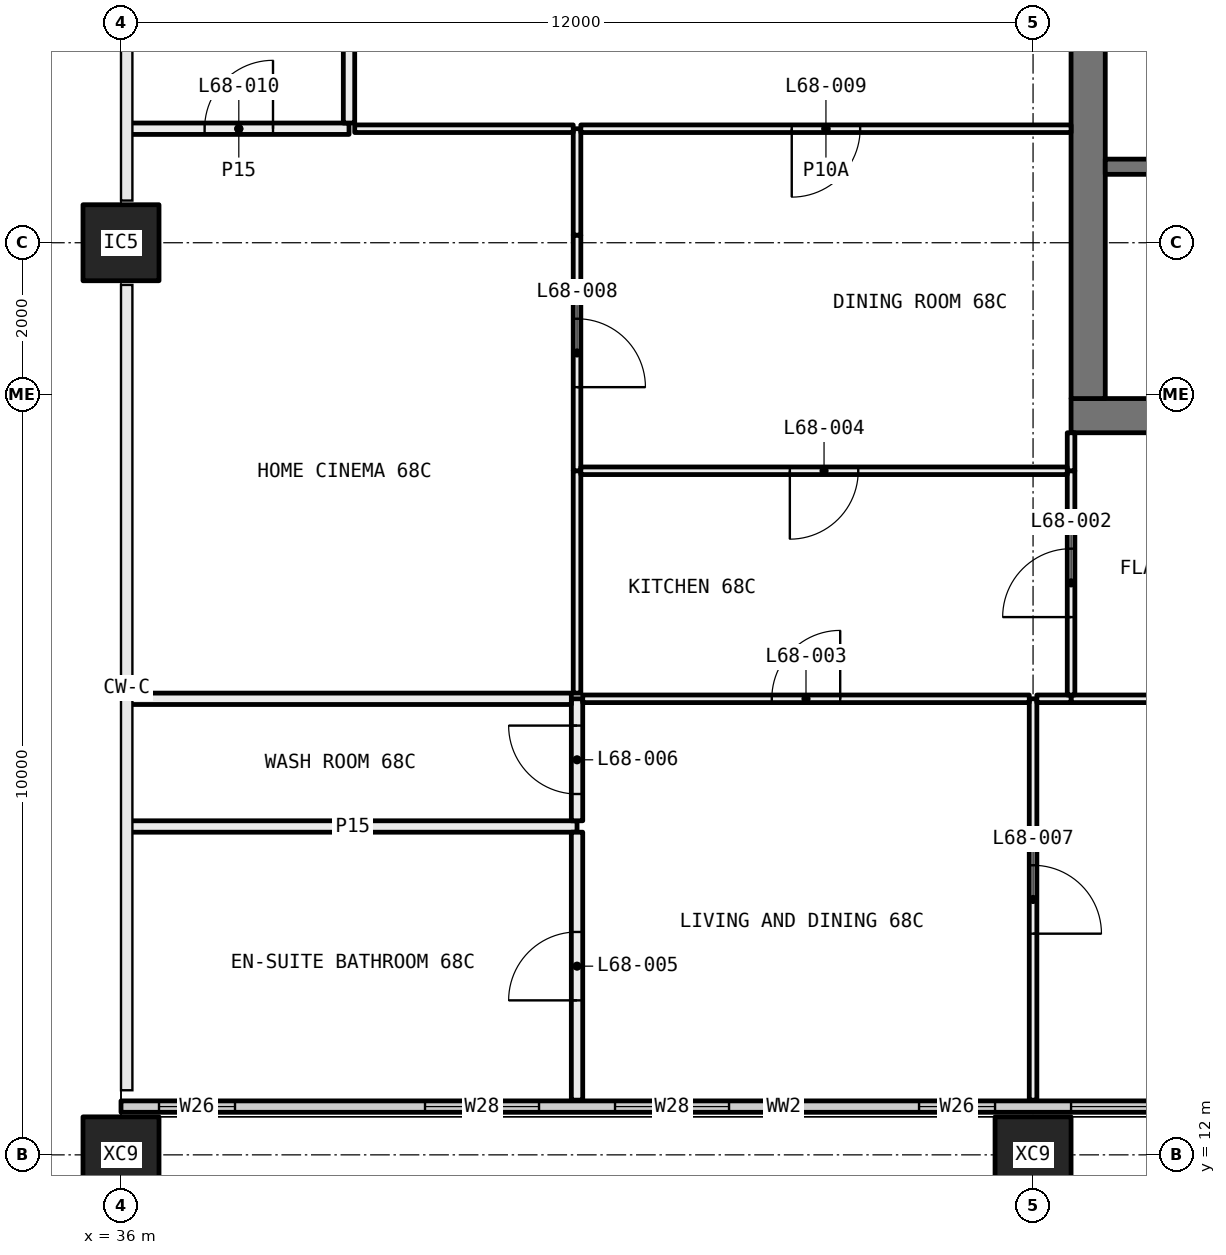
"""IFC4 building model, lengths in metres.
Left out: names, types, materials, properties, quantities, classifications, styles, units other than length and angle.
Written with IfcOpenShell. Run it as: python <this file> out.ifc"""

import sys

from ifc_helpers import new_model, si_unit, direction, frame, frame_2d, origin, origin_2d, place, context, subcontext, project, spatial, rectangle, hollow_rectangle, extrude, element, fill, save


model = new_model("IFC4")
c1 = context("Model", 3, precision=1e-05, world=origin(), true_north=direction((0.0, 1.0)))
c2 = subcontext(c1, "Body", "Model", "MODEL_VIEW")
j1 = project(units=[si_unit("LENGTHUNIT", "METRE"), si_unit("PLANEANGLEUNIT", "RADIAN")], contexts=[c1])
p1 = place(None, origin())
s1 = spatial("IfcSite", under=j1, at=p1, CompositionType="ELEMENT")
p2 = place(p1, origin())
s2 = spatial("IfcBuilding", under=s1, at=p2, CompositionType="ELEMENT")
p3 = place(p2, frame((0.0, 0.0, 252.45)))
s3 = spatial("IfcBuildingStorey", under=s2, at=p3, CompositionType="ELEMENT", Elevation=252.45)
p4 = place(p3, frame((36.0, 12.0, -0.4), z_axis=(0.0, 0.0, 1.0), x_axis=(1.0, 0.0, 0.0)))
e1 = element("IfcColumn", 1, at=p4, inside=s3, PredefinedType="COLUMN", context=c2, shape_type="SweptSolid", body=[
    extrude(hollow_rectangle(XDim=1.0, YDim=1.0, WallThickness=0.036, at=origin_2d()), origin(), (0.0, 0.0, 1.0), 3.45),
])
p5 = place(p3, frame((36.0, 24.0, 0.0), z_axis=(0.0, 0.0, 1.0), x_axis=(1.0, 0.0, 0.0)))
e2 = element("IfcColumn", 2, at=p5, inside=s3, PredefinedType="COLUMN", context=c2, shape_type="SweptSolid", body=[
    extrude(hollow_rectangle(XDim=1.0, YDim=1.0, WallThickness=0.04, at=origin_2d()), origin(), (0.0, 0.0, 1.0), 3.05),
])
p6 = place(p3, frame((48.0, 12.0, -0.4), z_axis=(0.0, 0.0, 1.0), x_axis=(1.0, 0.0, 0.0)))
e3 = element("IfcColumn", 3, at=p6, inside=s3, PredefinedType="COLUMN", context=c2, shape_type="SweptSolid", body=[
    extrude(hollow_rectangle(XDim=1.0, YDim=1.0, WallThickness=0.036, at=origin_2d()), origin(), (0.0, 0.0, 1.0), 3.45),
])
p7 = place(p3, frame((36.0, 12.635, 0.0), z_axis=(0.0, 0.0, 1.0), x_axis=(1.0, 0.0, 0.0)))
e4 = element("IfcWall", 4, at=p7, inside=s3, PredefinedType="ELEMENTEDWALL", context=c2, shape_type="SweptSolid", body=[
    extrude(rectangle(XDim=17.44, YDim=0.15, at=frame_2d((8.72, 0.0))), origin(), (0.0, 0.0, 1.0), 3.05),
])
p8 = place(p7, frame((0.5, 0.0, 0.45)))
e5 = element("IfcOpeningElement", 5, at=p8, cuts=e4, PredefinedType="OPENING", context=c2, shape_type="SweptSolid", body=[
    extrude(rectangle(XDim=1.0, YDim=2.55, at=frame_2d((0.5, 1.275))), frame((0.0, 0.085, 0.0), z_axis=(0.0, -1.0, 0.0), x_axis=(1.0, 0.0, 0.0)), (0.0, 0.0, 1.0), 0.17),
])
p9 = place(p7, frame((4.0, 0.0, 0.45)))
e6 = element("IfcOpeningElement", 6, at=p9, cuts=e4, PredefinedType="OPENING", context=c2, shape_type="SweptSolid", body=[
    extrude(rectangle(XDim=1.5, YDim=2.55, at=frame_2d((0.75, 1.275))), frame((0.0, 0.085, 0.0), z_axis=(0.0, -1.0, 0.0), x_axis=(1.0, 0.0, 0.0)), (0.0, 0.0, 1.0), 0.17),
])
p10 = place(p7, frame((6.5, 0.0, 0.45)))
e7 = element("IfcOpeningElement", 7, at=p10, cuts=e4, PredefinedType="OPENING", context=c2, shape_type="SweptSolid", body=[
    extrude(rectangle(XDim=1.5, YDim=2.55, at=frame_2d((0.75, 1.275))), frame((0.0, 0.085, 0.0), z_axis=(0.0, -1.0, 0.0), x_axis=(1.0, 0.0, 0.0)), (0.0, 0.0, 1.0), 0.17),
])
p11 = place(p7, frame((10.5, 0.0, 0.45)))
e8 = element("IfcOpeningElement", 8, at=p11, cuts=e4, PredefinedType="OPENING", context=c2, shape_type="SweptSolid", body=[
    extrude(rectangle(XDim=1.0, YDim=2.55, at=frame_2d((0.5, 1.275))), frame((0.0, 0.085, 0.0), z_axis=(0.0, -1.0, 0.0), x_axis=(1.0, 0.0, 0.0)), (0.0, 0.0, 1.0), 0.17),
])
p12 = place(p7, frame((12.5, 0.0, 0.45)))
e9 = element("IfcOpeningElement", 9, at=p12, cuts=e4, PredefinedType="OPENING", context=c2, shape_type="SweptSolid", body=[
    extrude(rectangle(XDim=4.5, YDim=2.55, at=frame_2d((2.25, 1.275))), frame((0.0, 0.085, 0.0), z_axis=(0.0, -1.0, 0.0), x_axis=(1.0, 0.0, 0.0)), (0.0, 0.0, 1.0), 0.17),
])
p13 = place(p3, frame((42.0, 16.32, 0.0), z_axis=(0.0, 0.0, 1.0), x_axis=(-1.0, 0.0, 0.0)))
e10 = element("IfcWall", 10, at=p13, inside=s3, PredefinedType="PARTITIONING", context=c2, shape_type="SweptSolid", body=[
    extrude(rectangle(XDim=5.9, YDim=0.15, at=frame_2d((2.95, 0.0))), origin(), (0.0, 0.0, 1.0), 3.05),
])
p14 = place(p3, frame((42.0, 12.72, 0.0), z_axis=(0.0, 0.0, 1.0), x_axis=(0.0, 1.0, 0.0)))
e11 = element("IfcWall", 11, at=p14, inside=s3, PredefinedType="PARTITIONING", context=c2, shape_type="SweptSolid", body=[
    extrude(rectangle(XDim=3.525, YDim=0.15, at=frame_2d((1.763, 0.0))), origin(), (0.0, 0.0, 1.0), 3.05),
])
p15 = place(p14, frame((1.312, 0.0, 0.0)))
e12 = element("IfcOpeningElement", 12, at=p15, cuts=e11, PredefinedType="OPENING", context=c2, shape_type="SweptSolid", body=[
    extrude(rectangle(XDim=0.9, YDim=2.1, at=frame_2d((0.45, 1.05))), frame((0.0, 0.085, 0.0), z_axis=(0.0, -1.0, 0.0), x_axis=(1.0, 0.0, 0.0)), (0.0, 0.0, 1.0), 0.17),
])
p16 = place(p3, frame((42.0, 16.395, 0.0), z_axis=(0.0, 0.0, 1.0), x_axis=(0.0, 1.0, 0.0)))
e13 = element("IfcWall", 13, at=p16, inside=s3, PredefinedType="PARTITIONING", context=c2, shape_type="SweptSolid", body=[
    extrude(rectangle(XDim=1.605, YDim=0.15, at=frame_2d((0.802, 0.0))), origin(), (0.0, 0.0, 1.0), 3.05),
])
p17 = place(p16, frame((0.353, 0.0, 0.0)))
e14 = element("IfcOpeningElement", 14, at=p17, cuts=e13, PredefinedType="OPENING", context=c2, shape_type="SweptSolid", body=[
    extrude(rectangle(XDim=0.9, YDim=2.1, at=frame_2d((0.45, 1.05))), frame((0.0, 0.085, 0.0), z_axis=(0.0, -1.0, 0.0), x_axis=(1.0, 0.0, 0.0)), (0.0, 0.0, 1.0), 0.17),
])
p18 = place(p3, frame((41.925, 18.0, 0.0), z_axis=(0.0, 0.0, 1.0), x_axis=(-1.0, 0.0, 0.0)))
e15 = element("IfcWall", 15, at=p18, inside=s3, PredefinedType="PARTITIONING", context=c2, shape_type="SweptSolid", body=[
    extrude(rectangle(XDim=5.825, YDim=0.15, at=frame_2d((2.913, 0.0))), origin(), (0.0, 0.0, 1.0), 3.05),
])
p19 = place(p3, frame((48.0, 12.72, 0.0), z_axis=(0.0, 0.0, 1.0), x_axis=(0.0, 1.0, 0.0)))
e16 = element("IfcWall", 16, at=p19, inside=s3, PredefinedType="PARTITIONING", context=c2, shape_type="SweptSolid", body=[
    extrude(rectangle(XDim=5.28, YDim=0.1, at=frame_2d((2.64, 0.0))), origin(), (0.0, 0.0, 1.0), 3.05),
])
p20 = place(p19, frame((2.19, 0.0, 0.0)))
e17 = element("IfcOpeningElement", 17, at=p20, cuts=e16, PredefinedType="OPENING", context=c2, shape_type="SweptSolid", body=[
    extrude(rectangle(XDim=0.9, YDim=2.1, at=frame_2d((0.45, 1.05))), frame((0.0, 0.06, 0.0), z_axis=(0.0, -1.0, 0.0), x_axis=(1.0, 0.0, 0.0)), (0.0, 0.0, 1.0), 0.12),
])
p21 = place(p3, frame((47.95, 18.0, 0.0), z_axis=(0.0, 0.0, 1.0), x_axis=(-1.0, 0.0, 0.0)))
e18 = element("IfcWall", 18, at=p21, inside=s3, PredefinedType="PARTITIONING", context=c2, shape_type="SweptSolid", body=[
    extrude(rectangle(XDim=5.875, YDim=0.1, at=frame_2d((2.938, 0.0))), origin(), (0.0, 0.0, 1.0), 3.05),
])
p22 = place(p21, frame((2.488, 0.0, 0.0)))
e19 = element("IfcOpeningElement", 19, at=p22, cuts=e18, PredefinedType="OPENING", context=c2, shape_type="SweptSolid", body=[
    extrude(rectangle(XDim=0.9, YDim=2.1, at=frame_2d((0.45, 1.05))), frame((0.0, 0.06, 0.0), z_axis=(0.0, -1.0, 0.0), x_axis=(1.0, 0.0, 0.0)), (0.0, 0.0, 1.0), 0.12),
])
p23 = place(p3, frame((53.28, 18.0, 0.0), z_axis=(0.0, 0.0, 1.0), x_axis=(-1.0, 0.0, 0.0)))
e20 = element("IfcWall", 20, at=p23, inside=s3, PredefinedType="PARTITIONING", context=c2, shape_type="SweptSolid", body=[
    extrude(rectangle(XDim=4.78, YDim=0.1, at=frame_2d((2.39, 0.0))), origin(), (0.0, 0.0, 1.0), 3.05),
])
p24 = place(p3, frame((48.5, 18.0, 0.0), z_axis=(0.0, 0.0, 1.0), x_axis=(-1.0, 0.0, 0.0)))
e21 = element("IfcWall", 21, at=p24, inside=s3, PredefinedType="PARTITIONING", context=c2, shape_type="SweptSolid", body=[
    extrude(rectangle(XDim=0.45, YDim=0.1, at=frame_2d((0.225, 0.0))), origin(), (0.0, 0.0, 1.0), 3.05),
])
p25 = place(p3, frame((48.5, 21.0, 0.0), z_axis=(0.0, 0.0, 1.0), x_axis=(0.0, -1.0, 0.0)))
e22 = element("IfcWall", 22, at=p25, inside=s3, PredefinedType="PARTITIONING", context=c2, shape_type="SweptSolid", body=[
    extrude(rectangle(XDim=2.95, YDim=0.1, at=frame_2d((1.475, 0.0))), origin(), (0.0, 0.0, 1.0), 3.05),
])
p26 = place(p25, frame((1.025, 0.0, 0.0)))
e23 = element("IfcOpeningElement", 23, at=p26, cuts=e22, PredefinedType="OPENING", context=c2, shape_type="SweptSolid", body=[
    extrude(rectangle(XDim=0.9, YDim=2.1, at=frame_2d((0.45, 1.05))), frame((0.0, 0.06, 0.0), z_axis=(0.0, -1.0, 0.0), x_axis=(1.0, 0.0, 0.0)), (0.0, 0.0, 1.0), 0.12),
])
p27 = place(p3, frame((48.5, 21.5, 0.0), z_axis=(0.0, 0.0, 1.0), x_axis=(0.0, -1.0, 0.0)))
e24 = element("IfcWall", 24, at=p27, inside=s3, PredefinedType="PARTITIONING", context=c2, shape_type="SweptSolid", body=[
    extrude(rectangle(XDim=0.5, YDim=0.1, at=frame_2d((0.25, 0.0))), origin(), (0.0, 0.0, 1.0), 3.05),
])
p28 = place(p3, frame((42.0, 18.075, 0.0), z_axis=(0.0, 0.0, 1.0), x_axis=(0.0, 1.0, 0.0)))
e25 = element("IfcWall", 25, at=p28, inside=s3, PredefinedType="PARTITIONING", context=c2, shape_type="SweptSolid", body=[
    extrude(rectangle(XDim=2.925, YDim=0.1, at=frame_2d((1.462, 0.0))), origin(), (0.0, 0.0, 1.0), 3.05),
])
p29 = place(p3, frame((42.0, 21.0, 0.0), z_axis=(0.0, 0.0, 1.0), x_axis=(0.0, 1.0, 0.0)))
e26 = element("IfcWall", 26, at=p29, inside=s3, PredefinedType="PARTITIONING", context=c2, shape_type="SweptSolid", body=[
    extrude(rectangle(XDim=3.1, YDim=0.1, at=frame_2d((1.55, 0.0))), origin(), (0.0, 0.0, 1.0), 2.45),
])
p30 = place(p29, frame((1.1, 0.0, 0.0)))
e27 = element("IfcOpeningElement", 27, at=p30, cuts=e26, PredefinedType="OPENING", context=c2, shape_type="SweptSolid", body=[
    extrude(rectangle(XDim=0.9, YDim=2.1, at=frame_2d((0.45, 1.05))), frame((0.0, 0.06, 0.0), z_axis=(0.0, -1.0, 0.0), x_axis=(1.0, 0.0, 0.0)), (0.0, 0.0, 1.0), 0.12),
])
p31 = place(p3, frame((42.0, 24.1, 0.0), z_axis=(0.0, 0.0, 1.0), x_axis=(0.0, 1.0, 0.0)))
e28 = element("IfcWall", 28, at=p31, inside=s3, PredefinedType="PARTITIONING", context=c2, shape_type="SweptSolid", body=[
    extrude(rectangle(XDim=1.4, YDim=0.1, at=frame_2d((0.7, 0.0))), origin(), (0.0, 0.0, 1.0), 3.05),
])
p32 = place(p3, frame((39.0, 25.5, 0.0), z_axis=(0.0, 0.0, 1.0), x_axis=(-1.0, 0.0, 0.0)))
e29 = element("IfcWall", 29, at=p32, inside=s3, PredefinedType="PARTITIONING", context=c2, shape_type="SweptSolid", body=[
    extrude(rectangle(XDim=2.9, YDim=0.15, at=frame_2d((1.45, 0.0))), origin(), (0.0, 0.0, 1.0), 3.05),
])
p33 = place(p32, frame((1.0, 0.0, 0.0)))
e30 = element("IfcOpeningElement", 30, at=p33, cuts=e29, PredefinedType="OPENING", context=c2, shape_type="SweptSolid", body=[
    extrude(rectangle(XDim=0.9, YDim=2.1, at=frame_2d((0.45, 1.05))), frame((0.0, 0.085, 0.0), z_axis=(0.0, -1.0, 0.0), x_axis=(1.0, 0.0, 0.0)), (0.0, 0.0, 1.0), 0.17),
])
p34 = place(p3, frame((41.95, 25.5, 0.0), z_axis=(0.0, 0.0, 1.0), x_axis=(-1.0, 0.0, 0.0)))
e31 = element("IfcWall", 31, at=p34, inside=s3, PredefinedType="PARTITIONING", context=c2, shape_type="SweptSolid", body=[
    extrude(rectangle(XDim=2.875, YDim=0.1, at=frame_2d((1.438, 0.0))), origin(), (0.0, 0.0, 1.0), 3.05),
])
p35 = place(p3, frame((48.45, 21.0, 0.0), z_axis=(0.0, 0.0, 1.0), x_axis=(-1.0, 0.0, 0.0)))
e32 = element("IfcWall", 32, at=p35, inside=s3, PredefinedType="PARTITIONING", context=c2, shape_type="SweptSolid", body=[
    extrude(rectangle(XDim=6.4, YDim=0.1, at=frame_2d((3.2, 0.0))), origin(), (0.0, 0.0, 1.0), 3.05),
])
p36 = place(p35, frame((2.75, 0.0, 0.0)))
e33 = element("IfcOpeningElement", 33, at=p36, cuts=e32, PredefinedType="OPENING", context=c2, shape_type="SweptSolid", body=[
    extrude(rectangle(XDim=0.9, YDim=2.1, at=frame_2d((0.45, 1.05))), frame((0.0, 0.06, 0.0), z_axis=(0.0, -1.0, 0.0), x_axis=(1.0, 0.0, 0.0)), (0.0, 0.0, 1.0), 0.12),
])
p37 = place(p3, frame((48.5, 25.5, 0.0), z_axis=(0.0, 0.0, 1.0), x_axis=(-1.0, 0.0, 0.0)))
e34 = element("IfcWall", 34, at=p37, inside=s3, PredefinedType="PARTITIONING", context=c2, shape_type="SweptSolid", body=[
    extrude(rectangle(XDim=6.45, YDim=0.1, at=frame_2d((3.225, 0.0))), origin(), (0.0, 0.0, 1.0), 3.05),
])
p38 = place(p37, frame((2.775, 0.0, 0.0)))
e35 = element("IfcOpeningElement", 35, at=p38, cuts=e34, PredefinedType="OPENING", context=c2, shape_type="SweptSolid", body=[
    extrude(rectangle(XDim=0.9, YDim=2.1, at=frame_2d((0.45, 1.05))), frame((0.0, 0.06, 0.0), z_axis=(0.0, -1.0, 0.0), x_axis=(1.0, 0.0, 0.0)), (0.0, 0.0, 1.0), 0.12),
])
p39 = place(p3, frame((39.0, 25.575, 0.0), z_axis=(0.0, 0.0, 1.0), x_axis=(0.0, 1.0, 0.0)))
e36 = element("IfcWall", 36, at=p39, inside=s3, PredefinedType="PARTITIONING", context=c2, shape_type="SweptSolid", body=[
    extrude(rectangle(XDim=1.712, YDim=0.15, at=frame_2d((0.856, 0.0))), origin(), (0.0, 0.0, 1.0), 3.05),
])
p40 = place(p3, frame((59.5, 21.725, 0.0), z_axis=(0.0, 0.0, 1.0), x_axis=(-1.0, 0.0, 0.0)))
e37 = element("IfcWall", 37, at=p40, inside=s3, PredefinedType="SHEAR", context=c2, shape_type="SweptSolid", body=[
    extrude(rectangle(XDim=11.0, YDim=0.45, at=frame_2d((5.5, 0.0))), origin(), (0.0, 0.0, 1.0), 3.05),
])
p41 = place(p40, frame((1.125, 0.0, 0.0)))
e38 = element("IfcOpeningElement", 38, at=p41, cuts=e37, PredefinedType="OPENING", context=c2, shape_type="SweptSolid", body=[
    extrude(rectangle(XDim=1.0, YDim=2.1, at=frame_2d((0.5, 1.05))), frame((0.0, 0.235, 0.0), z_axis=(0.0, -1.0, 0.0), x_axis=(1.0, 0.0, 0.0)), (0.0, 0.0, 1.0), 0.47),
])
p42 = place(p3, frame((48.725, 21.95, 0.0), z_axis=(0.0, 0.0, 1.0), x_axis=(0.0, 1.0, 0.0)))
e39 = element("IfcWall", 39, at=p42, inside=s3, PredefinedType="SHEAR", context=c2, shape_type="SweptSolid", body=[
    extrude(rectangle(XDim=16.1, YDim=0.45, at=frame_2d((8.05, 0.0))), origin(), (0.0, 0.0, 1.0), 3.05),
])
p43 = place(p42, frame((7.25, 0.0, 0.0)))
e40 = element("IfcOpeningElement", 40, at=p43, cuts=e39, PredefinedType="OPENING", context=c2, shape_type="SweptSolid", body=[
    extrude(rectangle(XDim=1.6, YDim=2.1, at=frame_2d((0.8, 1.05))), frame((0.0, 0.235, 0.0), z_axis=(0.0, -1.0, 0.0), x_axis=(1.0, 0.0, 0.0)), (0.0, 0.0, 1.0), 0.47),
])
p44 = place(p3, frame((56.5, 25.0, 0.0), z_axis=(0.0, 0.0, 1.0), x_axis=(-1.0, 0.0, 0.0)))
e41 = element("IfcWall", 41, at=p44, inside=s3, PredefinedType="SOLIDWALL", context=c2, shape_type="SweptSolid", body=[
    extrude(rectangle(XDim=7.55, YDim=0.2, at=frame_2d((3.775, 0.0))), origin(), (0.0, 0.0, 1.0), 3.05),
])
p45 = place(p8, origin())
e42 = element("IfcWindow", 42, at=p45, inside=s3, PartitioningType="SINGLE_PANEL", PredefinedType="WINDOW", context=c2, shape_type="SweptSolid", body=[
    extrude(rectangle(XDim=1.0, YDim=2.55, at=frame_2d((0.5, 1.275))), frame((0.0, 0.03, 0.0), z_axis=(0.0, -1.0, 0.0), x_axis=(1.0, 0.0, 0.0)), (0.0, 0.0, 1.0), 0.06),
])
fill(e5, e42)
p46 = place(p9, origin())
e43 = element("IfcWindow", 43, at=p46, inside=s3, PartitioningType="SINGLE_PANEL", PredefinedType="WINDOW", context=c2, shape_type="SweptSolid", body=[
    extrude(rectangle(XDim=1.5, YDim=2.55, at=frame_2d((0.75, 1.275))), frame((0.0, 0.03, 0.0), z_axis=(0.0, -1.0, 0.0), x_axis=(1.0, 0.0, 0.0)), (0.0, 0.0, 1.0), 0.06),
])
fill(e6, e43)
p47 = place(p10, origin())
e44 = element("IfcWindow", 44, at=p47, inside=s3, PartitioningType="SINGLE_PANEL", PredefinedType="WINDOW", context=c2, shape_type="SweptSolid", body=[
    extrude(rectangle(XDim=1.5, YDim=2.55, at=frame_2d((0.75, 1.275))), frame((0.0, 0.03, 0.0), z_axis=(0.0, -1.0, 0.0), x_axis=(1.0, 0.0, 0.0)), (0.0, 0.0, 1.0), 0.06),
])
fill(e7, e44)
p48 = place(p11, origin())
e45 = element("IfcWindow", 45, at=p48, inside=s3, PartitioningType="SINGLE_PANEL", PredefinedType="WINDOW", context=c2, shape_type="SweptSolid", body=[
    extrude(rectangle(XDim=1.0, YDim=2.55, at=frame_2d((0.5, 1.275))), frame((0.0, 0.03, 0.0), z_axis=(0.0, -1.0, 0.0), x_axis=(1.0, 0.0, 0.0)), (0.0, 0.0, 1.0), 0.06),
])
fill(e8, e45)
p49 = place(p12, origin())
e46 = element("IfcWindow", 46, at=p49, inside=s3, PartitioningType="SINGLE_PANEL", PredefinedType="WINDOW", context=c2, shape_type="SweptSolid", body=[
    extrude(rectangle(XDim=4.5, YDim=2.55, at=frame_2d((2.25, 1.275))), frame((0.0, 0.03, 0.0), z_axis=(0.0, -1.0, 0.0), x_axis=(1.0, 0.0, 0.0)), (0.0, 0.0, 1.0), 0.06),
])
fill(e9, e46)
p50 = place(p26, frame((0.9, 0.0, 0.0), x_axis=(-1.0, 0.0, 0.0)))
e47 = element("IfcDoor", 47, at=p50, inside=s3, OperationType="SINGLE_SWING_RIGHT", PredefinedType="DOOR", context=c2, shape_type="SweptSolid", body=[
    extrude(rectangle(XDim=0.9, YDim=2.1, at=frame_2d((0.45, 1.05))), frame((0.0, 0.025, 0.0), z_axis=(0.0, -1.0, 0.0), x_axis=(1.0, 0.0, 0.0)), (0.0, 0.0, 1.0), 0.05),
])
fill(e23, e47)
p51 = place(p22, frame((0.9, 0.0, 0.0), x_axis=(-1.0, 0.0, 0.0)))
e48 = element("IfcDoor", 48, at=p51, inside=s3, OperationType="SINGLE_SWING_LEFT", PredefinedType="DOOR", context=c2, shape_type="SweptSolid", body=[
    extrude(rectangle(XDim=0.9, YDim=2.1, at=frame_2d((0.45, 1.05))), frame((0.0, 0.025, 0.0), z_axis=(0.0, -1.0, 0.0), x_axis=(1.0, 0.0, 0.0)), (0.0, 0.0, 1.0), 0.05),
])
fill(e19, e48)
p52 = place(p36, origin())
e49 = element("IfcDoor", 49, at=p52, inside=s3, OperationType="SINGLE_SWING_LEFT", PredefinedType="DOOR", context=c2, shape_type="SweptSolid", body=[
    extrude(rectangle(XDim=0.9, YDim=2.1, at=frame_2d((0.45, 1.05))), frame((0.0, 0.025, 0.0), z_axis=(0.0, -1.0, 0.0), x_axis=(1.0, 0.0, 0.0)), (0.0, 0.0, 1.0), 0.05),
])
fill(e33, e49)
p53 = place(p15, origin())
e50 = element("IfcDoor", 50, at=p53, inside=s3, OperationType="SINGLE_SWING_RIGHT", PredefinedType="DOOR", context=c2, shape_type="SweptSolid", body=[
    extrude(rectangle(XDim=0.9, YDim=2.1, at=frame_2d((0.45, 1.05))), frame((0.0, 0.025, 0.0), z_axis=(0.0, -1.0, 0.0), x_axis=(1.0, 0.0, 0.0)), (0.0, 0.0, 1.0), 0.05),
])
fill(e12, e50)
p54 = place(p17, origin())
e51 = element("IfcDoor", 51, at=p54, inside=s3, OperationType="SINGLE_SWING_LEFT", PredefinedType="DOOR", context=c2, shape_type="SweptSolid", body=[
    extrude(rectangle(XDim=0.9, YDim=2.1, at=frame_2d((0.45, 1.05))), frame((0.0, 0.025, 0.0), z_axis=(0.0, -1.0, 0.0), x_axis=(1.0, 0.0, 0.0)), (0.0, 0.0, 1.0), 0.05),
])
fill(e14, e51)
p55 = place(p20, frame((0.9, 0.0, 0.0), x_axis=(-1.0, 0.0, 0.0)))
e52 = element("IfcDoor", 52, at=p55, inside=s3, OperationType="SINGLE_SWING_LEFT", PredefinedType="DOOR", context=c2, shape_type="SweptSolid", body=[
    extrude(rectangle(XDim=0.9, YDim=2.1, at=frame_2d((0.45, 1.05))), frame((0.0, 0.025, 0.0), z_axis=(0.0, -1.0, 0.0), x_axis=(1.0, 0.0, 0.0)), (0.0, 0.0, 1.0), 0.05),
])
fill(e17, e52)
p56 = place(p30, frame((0.9, 0.0, 0.0), x_axis=(-1.0, 0.0, 0.0)))
e53 = element("IfcDoor", 53, at=p56, inside=s3, OperationType="SINGLE_SWING_LEFT", PredefinedType="DOOR", context=c2, shape_type="SweptSolid", body=[
    extrude(rectangle(XDim=0.9, YDim=2.1, at=frame_2d((0.45, 1.05))), frame((0.0, 0.025, 0.0), z_axis=(0.0, -1.0, 0.0), x_axis=(1.0, 0.0, 0.0)), (0.0, 0.0, 1.0), 0.05),
])
fill(e27, e53)
p57 = place(p38, origin())
e54 = element("IfcDoor", 54, at=p57, inside=s3, OperationType="SINGLE_SWING_LEFT", PredefinedType="DOOR", context=c2, shape_type="SweptSolid", body=[
    extrude(rectangle(XDim=0.9, YDim=2.1, at=frame_2d((0.45, 1.05))), frame((0.0, 0.025, 0.0), z_axis=(0.0, -1.0, 0.0), x_axis=(1.0, 0.0, 0.0)), (0.0, 0.0, 1.0), 0.05),
])
fill(e35, e54)
p58 = place(p33, frame((0.9, 0.0, 0.0), x_axis=(-1.0, 0.0, 0.0)))
e55 = element("IfcDoor", 55, at=p58, inside=s3, OperationType="SINGLE_SWING_LEFT", PredefinedType="DOOR", context=c2, shape_type="SweptSolid", body=[
    extrude(rectangle(XDim=0.9, YDim=2.1, at=frame_2d((0.45, 1.05))), frame((0.0, 0.025, 0.0), z_axis=(0.0, -1.0, 0.0), x_axis=(1.0, 0.0, 0.0)), (0.0, 0.0, 1.0), 0.05),
])
fill(e30, e55)
save(model, sys.argv[1])
